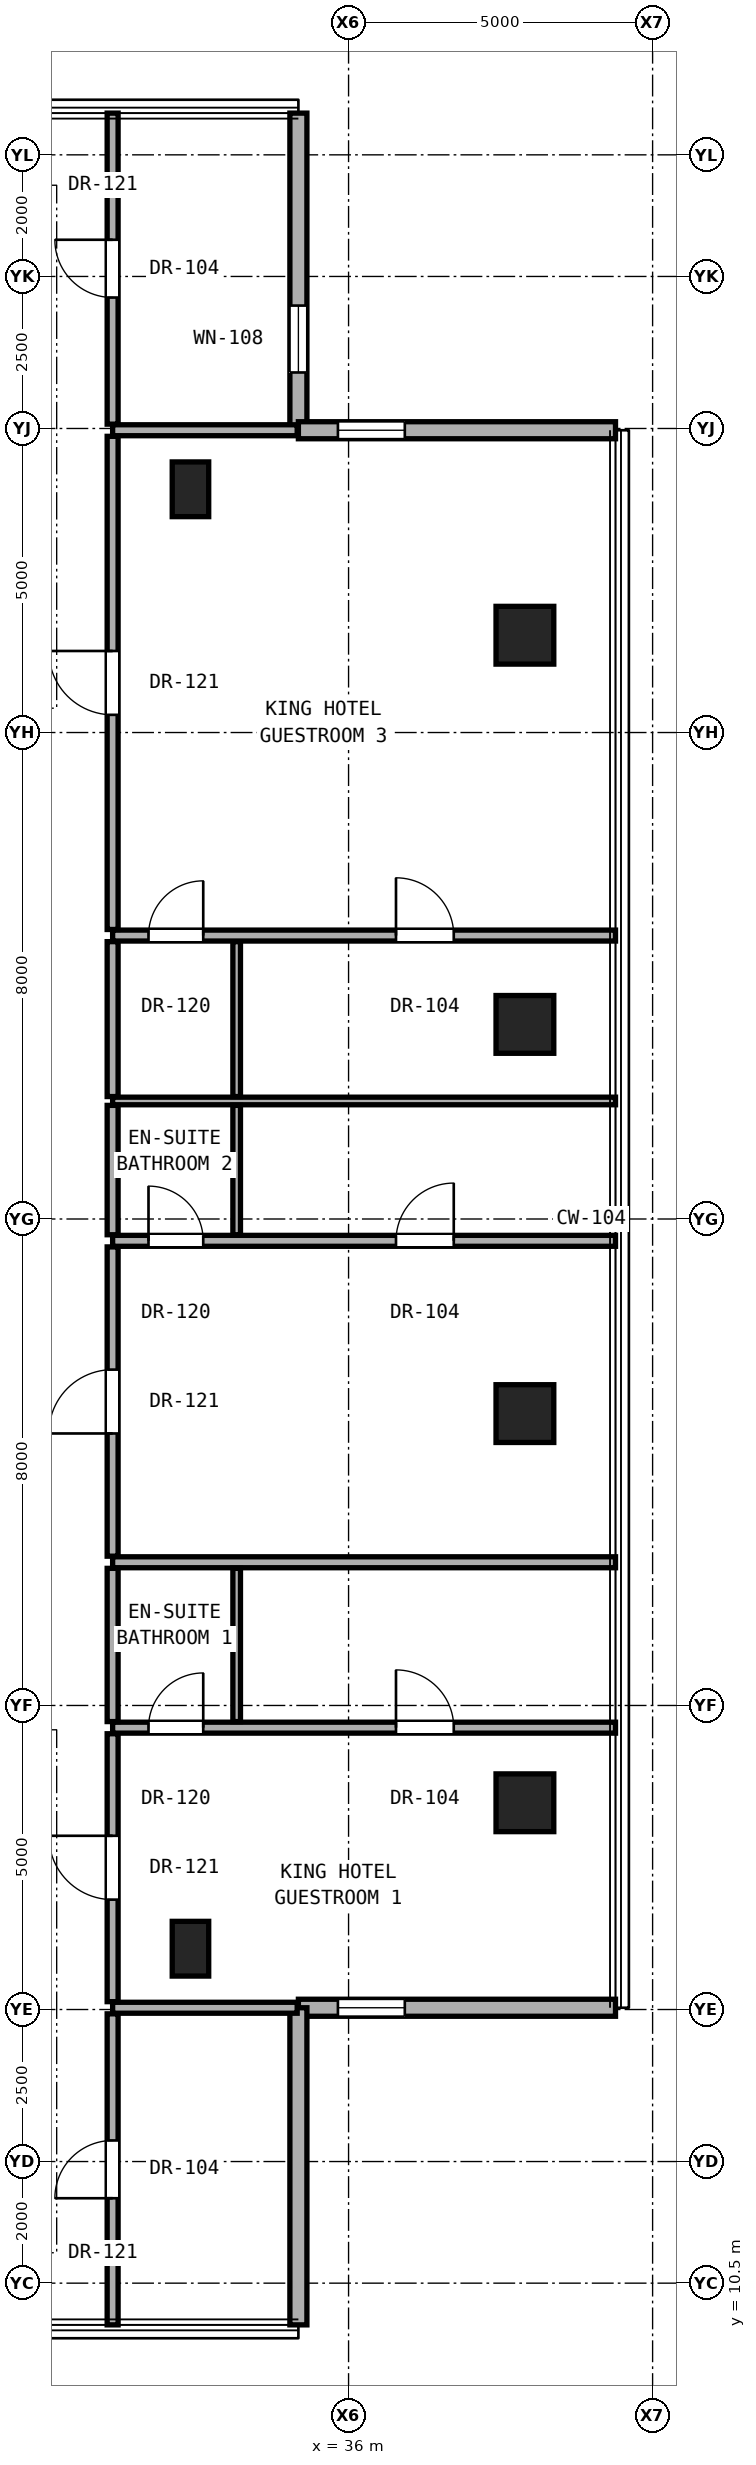
"""IFC4 building model, lengths in metres.
Left out: names, types, materials, properties, quantities, classifications, styles, units other than length and angle.
Written with IfcOpenShell. Run it as: python <this file> out.ifc"""

import sys

from ifc_helpers import new_model, si_unit, direction, frame, frame_2d, origin, origin_2d, place, context, subcontext, project, spatial, rectangle, hollow_rectangle, extrude, element, fill, save


model = new_model("IFC4")
c1 = context("Model", 3, precision=1e-05, world=origin(), true_north=direction((0.0, 1.0)))
c2 = subcontext(c1, "Body", "Model", "MODEL_VIEW")
j1 = project(units=[si_unit("LENGTHUNIT", "METRE"), si_unit("PLANEANGLEUNIT", "RADIAN")], contexts=[c1])
p1 = place(None, origin())
s1 = spatial("IfcSite", under=j1, at=p1, CompositionType="ELEMENT")
p2 = place(p1, origin())
s2 = spatial("IfcBuilding", under=s1, at=p2, CompositionType="ELEMENT")
p3 = place(p2, frame((0.0, 0.0, 190.15)))
s3 = spatial("IfcBuildingStorey", under=s2, at=p3, CompositionType="ELEMENT", Elevation=190.15)
for number, where, z_axis, x_axis in (
    (1, (38.9, 18.4, 0.0), (0.0, 0.0, 1.0), (1.0, 0.0, 0.0)),
    (2, (38.9, 24.8, 0.0), (0.0, 0.0, 1.0), (1.0, 0.0, 0.0)),
    (3, (38.9, 31.2, 0.0), (0.0, 0.0, 1.0), (1.0, 0.0, 0.0)),
    (4, (38.9, 37.6, 0.0), (0.0, 0.0, 1.0), (1.0, 0.0, 0.0)),
):
    element("IfcColumn", number, at=place(p3, frame(where, z_axis=z_axis, x_axis=x_axis)), inside=s3, PredefinedType="COLUMN", context=c2, shape_type="SweptSolid", body=[
        extrude(hollow_rectangle(XDim=0.95, YDim=0.95, WallThickness=0.05, at=origin_2d()), origin(), (0.0, 0.0, 1.0), 3.25),
    ])
for number, where, z_axis, x_axis in (
    (5, (33.4, 16.0, 0.0), (0.0, 0.0, 1.0), (1.0, 0.0, 0.0)),
    (6, (33.4, 40.0, 0.0), (0.0, 0.0, 1.0), (1.0, 0.0, 0.0)),
):
    element("IfcColumn", number, at=place(p3, frame(where, z_axis=z_axis, x_axis=x_axis)), inside=s3, PredefinedType="PILASTER", context=c2, shape_type="SweptSolid", body=[
        extrude(rectangle(XDim=0.6, YDim=0.9, at=origin_2d()), origin(), (0.0, 0.0, 1.0), 3.25),
    ])
p4 = place(p3, frame((35.175, 40.971, 0.0), z_axis=(0.0, 0.0, 1.0), x_axis=(0.0, 1.0, 0.0)))
e7 = element("IfcWall", 7, at=p4, inside=s3, PredefinedType="SOLIDWALL", context=c2, shape_type="SweptSolid", body=[
    extrude(rectangle(XDim=5.215, YDim=0.28, at=frame_2d((2.607, 0.0))), origin(), (0.0, 0.0, 1.0), 3.03),
])
p5 = place(p4, frame((0.95, 0.0, 0.85)))
e8 = element("IfcOpeningElement", 8, at=p5, cuts=e7, PredefinedType="OPENING", context=c2, shape_type="SweptSolid", body=[
    extrude(rectangle(XDim=1.1, YDim=2.0, at=frame_2d((0.55, 1.0))), frame((0.0, 0.15, 0.0), z_axis=(0.0, -1.0, 0.0), x_axis=(1.0, 0.0, 0.0)), (0.0, 0.0, 1.0), 0.3),
])
p6 = place(p3, frame((35.175, 15.029, 0.0), z_axis=(0.0, 0.0, 1.0), x_axis=(1.0, 0.0, 0.0)))
e9 = element("IfcWall", 9, at=p6, inside=s3, PredefinedType="SOLIDWALL", context=c2, shape_type="SweptSolid", body=[
    extrude(rectangle(XDim=5.215, YDim=0.28, at=frame_2d((2.607, 0.0))), origin(), (0.0, 0.0, 1.0), 3.03),
])
p7 = place(p6, frame((0.65, 0.0, 0.85)))
e10 = element("IfcOpeningElement", 10, at=p7, cuts=e9, PredefinedType="OPENING", context=c2, shape_type="SweptSolid", body=[
    extrude(rectangle(XDim=1.1, YDim=2.0, at=frame_2d((0.55, 1.0))), frame((0.0, 0.15, 0.0), z_axis=(0.0, -1.0, 0.0), x_axis=(1.0, 0.0, 0.0)), (0.0, 0.0, 1.0), 0.3),
])
p8 = place(p3, frame((35.175, 9.814, 0.0), z_axis=(0.0, 0.0, 1.0), x_axis=(0.0, 1.0, 0.0)))
e11 = element("IfcWall", 11, at=p8, inside=s3, PredefinedType="SOLIDWALL", context=c2, shape_type="SweptSolid", body=[
    extrude(rectangle(XDim=5.215, YDim=0.28, at=frame_2d((2.607, 0.0))), origin(), (0.0, 0.0, 1.0), 3.03),
])
p9 = place(p3, frame((40.39, 40.971, 0.0), z_axis=(0.0, 0.0, 1.0), x_axis=(-1.0, 0.0, 0.0)))
e12 = element("IfcWall", 12, at=p9, inside=s3, PredefinedType="SOLIDWALL", context=c2, shape_type="SweptSolid", body=[
    extrude(rectangle(XDim=5.215, YDim=0.28, at=frame_2d((2.607, 0.0))), origin(), (0.0, 0.0, 1.0), 3.03),
])
p10 = place(p9, frame((3.465, 0.0, 0.85)))
e13 = element("IfcOpeningElement", 13, at=p10, cuts=e12, PredefinedType="OPENING", context=c2, shape_type="SweptSolid", body=[
    extrude(rectangle(XDim=1.1, YDim=2.0, at=frame_2d((0.55, 1.0))), frame((0.0, 0.15, 0.0), z_axis=(0.0, -1.0, 0.0), x_axis=(1.0, 0.0, 0.0)), (0.0, 0.0, 1.0), 0.3),
])
p11 = place(p3, frame((32.12, 15.029, 0.0), z_axis=(0.0, 0.0, 1.0), x_axis=(1.0, 0.0, 0.0)))
e14 = element("IfcWall", 14, at=p11, inside=s3, PredefinedType="PARTITIONING", context=c2, shape_type="SweptSolid", body=[
    extrude(rectangle(XDim=3.035, YDim=0.18, at=frame_2d((1.518, 0.0))), origin(), (0.0, 0.0, 1.0), 3.05),
])
p12 = place(p3, frame((32.12, 19.635, 0.0), z_axis=(0.0, 0.0, 1.0), x_axis=(1.0, 0.0, 0.0)))
e15 = element("IfcWall", 15, at=p12, inside=s3, PredefinedType="PARTITIONING", context=c2, shape_type="SweptSolid", body=[
    extrude(rectangle(XDim=8.27, YDim=0.18, at=frame_2d((4.135, 0.0))), origin(), (0.0, 0.0, 1.0), 2.269),
])
p13 = place(p12, frame((4.66, 0.0, 0.0)))
e16 = element("IfcOpeningElement", 16, at=p13, cuts=e15, PredefinedType="OPENING", context=c2, shape_type="SweptSolid", body=[
    extrude(rectangle(XDim=0.95, YDim=2.15, at=frame_2d((0.475, 1.075))), frame((0.0, 0.1, 0.0), z_axis=(0.0, -1.0, 0.0), x_axis=(1.0, 0.0, 0.0)), (0.0, 0.0, 1.0), 0.2),
])
p14 = place(p12, frame((0.59, 0.0, 0.0)))
e17 = element("IfcOpeningElement", 17, at=p14, cuts=e15, PredefinedType="OPENING", context=c2, shape_type="SweptSolid", body=[
    extrude(rectangle(XDim=0.9, YDim=2.1, at=frame_2d((0.45, 1.05))), frame((0.0, 0.1, 0.0), z_axis=(0.0, -1.0, 0.0), x_axis=(1.0, 0.0, 0.0)), (0.0, 0.0, 1.0), 0.2),
])
p15 = place(p3, frame((32.12, 22.355, 0.0), z_axis=(0.0, 0.0, 1.0), x_axis=(1.0, 0.0, 0.0)))
e18 = element("IfcWall", 18, at=p15, inside=s3, PredefinedType="PARTITIONING", context=c2, shape_type="SweptSolid", body=[
    extrude(rectangle(XDim=8.27, YDim=0.18, at=frame_2d((4.135, 0.0))), origin(), (0.0, 0.0, 1.0), 2.269),
])
p16 = place(p3, frame((32.12, 27.641, 0.0), z_axis=(0.0, 0.0, 1.0), x_axis=(1.0, 0.0, 0.0)))
e19 = element("IfcWall", 19, at=p16, inside=s3, PredefinedType="PARTITIONING", context=c2, shape_type="SweptSolid", body=[
    extrude(rectangle(XDim=8.27, YDim=0.18, at=frame_2d((4.135, 0.0))), origin(), (0.0, 0.0, 1.0), 2.269),
])
p17 = place(p16, frame((4.66, 0.0, 0.0)))
e20 = element("IfcOpeningElement", 20, at=p17, cuts=e19, PredefinedType="OPENING", context=c2, shape_type="SweptSolid", body=[
    extrude(rectangle(XDim=0.95, YDim=2.15, at=frame_2d((0.475, 1.075))), frame((0.0, 0.1, 0.0), z_axis=(0.0, -1.0, 0.0), x_axis=(1.0, 0.0, 0.0)), (0.0, 0.0, 1.0), 0.2),
])
p18 = place(p16, frame((0.59, 0.0, 0.0)))
e21 = element("IfcOpeningElement", 21, at=p18, cuts=e19, PredefinedType="OPENING", context=c2, shape_type="SweptSolid", body=[
    extrude(rectangle(XDim=0.9, YDim=2.1, at=frame_2d((0.45, 1.05))), frame((0.0, 0.1, 0.0), z_axis=(0.0, -1.0, 0.0), x_axis=(1.0, 0.0, 0.0)), (0.0, 0.0, 1.0), 0.2),
])
p19 = place(p3, frame((32.12, 29.941, 0.0), z_axis=(0.0, 0.0, 1.0), x_axis=(1.0, 0.0, 0.0)))
e22 = element("IfcWall", 22, at=p19, inside=s3, PredefinedType="PARTITIONING", context=c2, shape_type="SweptSolid", body=[
    extrude(rectangle(XDim=8.27, YDim=0.125, at=frame_2d((4.135, 0.0))), origin(), (0.0, 0.0, 1.0), 2.269),
])
p20 = place(p3, frame((32.12, 32.661, 0.0), z_axis=(0.0, 0.0, 1.0), x_axis=(1.0, 0.0, 0.0)))
e23 = element("IfcWall", 23, at=p20, inside=s3, PredefinedType="PARTITIONING", context=c2, shape_type="SweptSolid", body=[
    extrude(rectangle(XDim=8.27, YDim=0.18, at=frame_2d((4.135, 0.0))), origin(), (0.0, 0.0, 1.0), 2.269),
])
p21 = place(p20, frame((4.66, 0.0, 0.0)))
e24 = element("IfcOpeningElement", 24, at=p21, cuts=e23, PredefinedType="OPENING", context=c2, shape_type="SweptSolid", body=[
    extrude(rectangle(XDim=0.95, YDim=2.15, at=frame_2d((0.475, 1.075))), frame((0.0, 0.1, 0.0), z_axis=(0.0, -1.0, 0.0), x_axis=(1.0, 0.0, 0.0)), (0.0, 0.0, 1.0), 0.2),
])
p22 = place(p20, frame((0.59, 0.0, 0.0)))
e25 = element("IfcOpeningElement", 25, at=p22, cuts=e23, PredefinedType="OPENING", context=c2, shape_type="SweptSolid", body=[
    extrude(rectangle(XDim=0.9, YDim=2.1, at=frame_2d((0.45, 1.05))), frame((0.0, 0.1, 0.0), z_axis=(0.0, -1.0, 0.0), x_axis=(1.0, 0.0, 0.0)), (0.0, 0.0, 1.0), 0.2),
])
p23 = place(p3, frame((32.12, 40.971, 0.0), z_axis=(0.0, 0.0, 1.0), x_axis=(1.0, 0.0, 0.0)))
e26 = element("IfcWall", 26, at=p23, inside=s3, PredefinedType="PARTITIONING", context=c2, shape_type="SweptSolid", body=[
    extrude(rectangle(XDim=3.035, YDim=0.18, at=frame_2d((1.518, 0.0))), origin(), (0.0, 0.0, 1.0), 3.05),
])
p24 = place(p3, frame((32.12, 9.814, 0.0), z_axis=(0.0, 0.0, 1.0), x_axis=(0.0, 1.0, 0.0)))
e27 = element("IfcWall", 27, at=p24, inside=s3, PredefinedType="PARTITIONING", context=c2, shape_type="SweptSolid", body=[
    extrude(rectangle(XDim=5.115, YDim=0.18, at=frame_2d((2.558, 0.0))), origin(), (0.0, 0.0, 1.0), 3.05),
])
p25 = place(p24, frame((2.083, 0.0, 0.0)))
e28 = element("IfcOpeningElement", 28, at=p25, cuts=e27, PredefinedType="OPENING", context=c2, shape_type="SweptSolid", body=[
    extrude(rectangle(XDim=0.95, YDim=2.15, at=frame_2d((0.475, 1.075))), frame((0.0, 0.1, 0.0), z_axis=(0.0, -1.0, 0.0), x_axis=(1.0, 0.0, 0.0)), (0.0, 0.0, 1.0), 0.2),
])
p26 = place(p3, frame((32.12, 15.129, 0.0), z_axis=(0.0, 0.0, 1.0), x_axis=(0.0, 1.0, 0.0)))
e29 = element("IfcWall", 29, at=p26, inside=s3, PredefinedType="PARTITIONING", context=c2, shape_type="SweptSolid", body=[
    extrude(rectangle(XDim=4.406, YDim=0.18, at=frame_2d((2.203, 0.0))), origin(), (0.0, 0.0, 1.0), 2.442),
])
p27 = place(p26, frame((1.678, 0.0, 0.0)))
e30 = element("IfcOpeningElement", 30, at=p27, cuts=e29, PredefinedType="OPENING", context=c2, shape_type="SweptSolid", body=[
    extrude(rectangle(XDim=1.05, YDim=2.2, at=frame_2d((0.525, 1.1))), frame((0.0, 0.1, 0.0), z_axis=(0.0, -1.0, 0.0), x_axis=(1.0, 0.0, 0.0)), (0.0, 0.0, 1.0), 0.2),
])
p28 = place(p3, frame((32.12, 19.735, 0.0), z_axis=(0.0, 0.0, 1.0), x_axis=(0.0, 1.0, 0.0)))
e31 = element("IfcWall", 31, at=p28, inside=s3, PredefinedType="PARTITIONING", context=c2, shape_type="SweptSolid", body=[
    extrude(rectangle(XDim=2.52, YDim=0.18, at=frame_2d((1.26, 0.0))), origin(), (0.0, 0.0, 1.0), 3.05),
])
p29 = place(p3, frame((32.12, 22.455, 0.0), z_axis=(0.0, 0.0, 1.0), x_axis=(0.0, 1.0, 0.0)))
e32 = element("IfcWall", 32, at=p29, inside=s3, PredefinedType="PARTITIONING", context=c2, shape_type="SweptSolid", body=[
    extrude(rectangle(XDim=5.086, YDim=0.18, at=frame_2d((2.543, 0.0))), origin(), (0.0, 0.0, 1.0), 2.346),
])
p30 = place(p29, frame((2.018, 0.0, 0.0)))
e33 = element("IfcOpeningElement", 33, at=p30, cuts=e32, PredefinedType="OPENING", context=c2, shape_type="SweptSolid", body=[
    extrude(rectangle(XDim=1.05, YDim=2.2, at=frame_2d((0.525, 1.1))), frame((0.0, 0.1, 0.0), z_axis=(0.0, -1.0, 0.0), x_axis=(1.0, 0.0, 0.0)), (0.0, 0.0, 1.0), 0.2),
])
p31 = place(p3, frame((32.12, 27.741, 0.0), z_axis=(0.0, 0.0, 1.0), x_axis=(0.0, 1.0, 0.0)))
e34 = element("IfcWall", 34, at=p31, inside=s3, PredefinedType="PARTITIONING", context=c2, shape_type="SweptSolid", body=[
    extrude(rectangle(XDim=2.127, YDim=0.18, at=frame_2d((1.064, 0.0))), origin(), (0.0, 0.0, 1.0), 3.05),
])
p32 = place(p3, frame((32.12, 30.013, 0.0), z_axis=(0.0, 0.0, 1.0), x_axis=(0.0, 1.0, 0.0)))
e35 = element("IfcWall", 35, at=p32, inside=s3, PredefinedType="PARTITIONING", context=c2, shape_type="SweptSolid", body=[
    extrude(rectangle(XDim=2.548, YDim=0.18, at=frame_2d((1.274, 0.0))), origin(), (0.0, 0.0, 1.0), 2.346),
])
p33 = place(p3, frame((32.12, 32.761, 0.0), z_axis=(0.0, 0.0, 1.0), x_axis=(0.0, 1.0, 0.0)))
e36 = element("IfcWall", 36, at=p33, inside=s3, PredefinedType="PARTITIONING", context=c2, shape_type="SweptSolid", body=[
    extrude(rectangle(XDim=8.11, YDim=0.18, at=frame_2d((4.055, 0.0))), origin(), (0.0, 0.0, 1.0), 2.442),
])
p34 = place(p33, frame((3.53, 0.0, 0.0)))
e37 = element("IfcOpeningElement", 37, at=p34, cuts=e36, PredefinedType="OPENING", context=c2, shape_type="SweptSolid", body=[
    extrude(rectangle(XDim=1.05, YDim=2.2, at=frame_2d((0.525, 1.1))), frame((0.0, 0.1, 0.0), z_axis=(0.0, -1.0, 0.0), x_axis=(1.0, 0.0, 0.0)), (0.0, 0.0, 1.0), 0.2),
])
p35 = place(p3, frame((32.12, 41.071, 0.0), z_axis=(0.0, 0.0, 1.0), x_axis=(0.0, 1.0, 0.0)))
e38 = element("IfcWall", 38, at=p35, inside=s3, PredefinedType="PARTITIONING", context=c2, shape_type="SweptSolid", body=[
    extrude(rectangle(XDim=5.115, YDim=0.18, at=frame_2d((2.558, 0.0))), origin(), (0.0, 0.0, 1.0), 3.05),
])
p36 = place(p35, frame((2.083, 0.0, 0.0)))
e39 = element("IfcOpeningElement", 39, at=p36, cuts=e38, PredefinedType="OPENING", context=c2, shape_type="SweptSolid", body=[
    extrude(rectangle(XDim=0.95, YDim=2.15, at=frame_2d((0.475, 1.075))), frame((0.0, 0.1, 0.0), z_axis=(0.0, -1.0, 0.0), x_axis=(1.0, 0.0, 0.0)), (0.0, 0.0, 1.0), 0.2),
])
p37 = place(p3, frame((34.16, 19.735, 0.0), z_axis=(0.0, 0.0, 1.0), x_axis=(0.0, 1.0, 0.0)))
e40 = element("IfcWall", 40, at=p37, inside=s3, PredefinedType="PARTITIONING", context=c2, shape_type="SweptSolid", body=[
    extrude(rectangle(XDim=2.52, YDim=0.125, at=frame_2d((1.26, 0.0))), origin(), (0.0, 0.0, 1.0), 3.05),
])
p38 = place(p3, frame((34.16, 27.741, 0.0), z_axis=(0.0, 0.0, 1.0), x_axis=(0.0, 1.0, 0.0)))
e41 = element("IfcWall", 41, at=p38, inside=s3, PredefinedType="PARTITIONING", context=c2, shape_type="SweptSolid", body=[
    extrude(rectangle(XDim=2.127, YDim=0.125, at=frame_2d((1.064, 0.0))), origin(), (0.0, 0.0, 1.0), 3.05),
])
p39 = place(p3, frame((34.16, 30.013, 0.0), z_axis=(0.0, 0.0, 1.0), x_axis=(0.0, 1.0, 0.0)))
e42 = element("IfcWall", 42, at=p39, inside=s3, PredefinedType="PARTITIONING", context=c2, shape_type="SweptSolid", body=[
    extrude(rectangle(XDim=2.548, YDim=0.125, at=frame_2d((1.274, 0.0))), origin(), (0.0, 0.0, 1.0), 2.346),
])
p40 = place(p5, origin())
e43 = element("IfcWindow", 43, at=p40, inside=s3, PartitioningType="SINGLE_PANEL", PredefinedType="WINDOW", context=c2, shape_type="SweptSolid", body=[
    extrude(rectangle(XDim=1.1, YDim=2.0, at=frame_2d((0.55, 1.0))), frame((0.0, 0.03, 0.0), z_axis=(0.0, -1.0, 0.0), x_axis=(1.0, 0.0, 0.0)), (0.0, 0.0, 1.0), 0.06),
])
fill(e8, e43)
p41 = place(p7, origin())
e44 = element("IfcWindow", 44, at=p41, inside=s3, PartitioningType="SINGLE_PANEL", PredefinedType="WINDOW", context=c2, shape_type="SweptSolid", body=[
    extrude(rectangle(XDim=1.1, YDim=2.0, at=frame_2d((0.55, 1.0))), frame((0.0, 0.03, 0.0), z_axis=(0.0, -1.0, 0.0), x_axis=(1.0, 0.0, 0.0)), (0.0, 0.0, 1.0), 0.06),
])
fill(e10, e44)
p42 = place(p10, origin())
e45 = element("IfcWindow", 45, at=p42, inside=s3, PartitioningType="SINGLE_PANEL", PredefinedType="WINDOW", context=c2, shape_type="SweptSolid", body=[
    extrude(rectangle(XDim=1.1, YDim=2.0, at=frame_2d((0.55, 1.0))), frame((0.0, 0.03, 0.0), z_axis=(0.0, -1.0, 0.0), x_axis=(1.0, 0.0, 0.0)), (0.0, 0.0, 1.0), 0.06),
])
fill(e13, e45)
p43 = place(p27, origin())
e46 = element("IfcDoor", 46, at=p43, inside=s3, OperationType="SINGLE_SWING_RIGHT", PredefinedType="DOOR", context=c2, shape_type="SweptSolid", body=[
    extrude(rectangle(XDim=1.05, YDim=2.2, at=frame_2d((0.525, 1.1))), frame((0.0, 0.025, 0.0), z_axis=(0.0, -1.0, 0.0), x_axis=(1.0, 0.0, 0.0)), (0.0, 0.0, 1.0), 0.05),
])
fill(e30, e46)
p44 = place(p13, origin())
e47 = element("IfcDoor", 47, at=p44, inside=s3, OperationType="SINGLE_SWING_LEFT", PredefinedType="DOOR", context=c2, shape_type="SweptSolid", body=[
    extrude(rectangle(XDim=0.95, YDim=2.15, at=frame_2d((0.475, 1.075))), frame((0.0, 0.025, 0.0), z_axis=(0.0, -1.0, 0.0), x_axis=(1.0, 0.0, 0.0)), (0.0, 0.0, 1.0), 0.05),
])
fill(e16, e47)
p45 = place(p14, origin())
e48 = element("IfcDoor", 48, at=p45, inside=s3, OperationType="SINGLE_SWING_RIGHT", PredefinedType="DOOR", context=c2, shape_type="SweptSolid", body=[
    extrude(rectangle(XDim=0.9, YDim=2.1, at=frame_2d((0.45, 1.05))), frame((0.0, 0.025, 0.0), z_axis=(0.0, -1.0, 0.0), x_axis=(1.0, 0.0, 0.0)), (0.0, 0.0, 1.0), 0.05),
])
fill(e17, e48)
p46 = place(p30, origin())
e49 = element("IfcDoor", 49, at=p46, inside=s3, OperationType="SINGLE_SWING_LEFT", PredefinedType="DOOR", context=c2, shape_type="SweptSolid", body=[
    extrude(rectangle(XDim=1.05, YDim=2.2, at=frame_2d((0.525, 1.1))), frame((0.0, 0.025, 0.0), z_axis=(0.0, -1.0, 0.0), x_axis=(1.0, 0.0, 0.0)), (0.0, 0.0, 1.0), 0.05),
])
fill(e33, e49)
p47 = place(p17, origin())
e50 = element("IfcDoor", 50, at=p47, inside=s3, OperationType="SINGLE_SWING_RIGHT", PredefinedType="DOOR", context=c2, shape_type="SweptSolid", body=[
    extrude(rectangle(XDim=0.95, YDim=2.15, at=frame_2d((0.475, 1.075))), frame((0.0, 0.025, 0.0), z_axis=(0.0, -1.0, 0.0), x_axis=(1.0, 0.0, 0.0)), (0.0, 0.0, 1.0), 0.05),
])
fill(e20, e50)
p48 = place(p18, origin())
e51 = element("IfcDoor", 51, at=p48, inside=s3, OperationType="SINGLE_SWING_LEFT", PredefinedType="DOOR", context=c2, shape_type="SweptSolid", body=[
    extrude(rectangle(XDim=0.9, YDim=2.1, at=frame_2d((0.45, 1.05))), frame((0.0, 0.025, 0.0), z_axis=(0.0, -1.0, 0.0), x_axis=(1.0, 0.0, 0.0)), (0.0, 0.0, 1.0), 0.05),
])
fill(e21, e51)
p49 = place(p34, origin())
e52 = element("IfcDoor", 52, at=p49, inside=s3, OperationType="SINGLE_SWING_RIGHT", PredefinedType="DOOR", context=c2, shape_type="SweptSolid", body=[
    extrude(rectangle(XDim=1.05, YDim=2.2, at=frame_2d((0.525, 1.1))), frame((0.0, 0.025, 0.0), z_axis=(0.0, -1.0, 0.0), x_axis=(1.0, 0.0, 0.0)), (0.0, 0.0, 1.0), 0.05),
])
fill(e37, e52)
p50 = place(p21, origin())
e53 = element("IfcDoor", 53, at=p50, inside=s3, OperationType="SINGLE_SWING_LEFT", PredefinedType="DOOR", context=c2, shape_type="SweptSolid", body=[
    extrude(rectangle(XDim=0.95, YDim=2.15, at=frame_2d((0.475, 1.075))), frame((0.0, 0.025, 0.0), z_axis=(0.0, -1.0, 0.0), x_axis=(1.0, 0.0, 0.0)), (0.0, 0.0, 1.0), 0.05),
])
fill(e24, e53)
p51 = place(p22, origin())
e54 = element("IfcDoor", 54, at=p51, inside=s3, OperationType="SINGLE_SWING_RIGHT", PredefinedType="DOOR", context=c2, shape_type="SweptSolid", body=[
    extrude(rectangle(XDim=0.9, YDim=2.1, at=frame_2d((0.45, 1.05))), frame((0.0, 0.025, 0.0), z_axis=(0.0, -1.0, 0.0), x_axis=(1.0, 0.0, 0.0)), (0.0, 0.0, 1.0), 0.05),
])
fill(e25, e54)
p52 = place(p25, origin())
e55 = element("IfcDoor", 55, at=p52, inside=s3, OperationType="SINGLE_SWING_LEFT", PredefinedType="DOOR", context=c2, shape_type="SweptSolid", body=[
    extrude(rectangle(XDim=0.95, YDim=2.15, at=frame_2d((0.475, 1.075))), frame((0.0, 0.025, 0.0), z_axis=(0.0, -1.0, 0.0), x_axis=(1.0, 0.0, 0.0)), (0.0, 0.0, 1.0), 0.05),
])
fill(e28, e55)
p53 = place(p36, origin())
e56 = element("IfcDoor", 56, at=p53, inside=s3, OperationType="SINGLE_SWING_RIGHT", PredefinedType="DOOR", context=c2, shape_type="SweptSolid", body=[
    extrude(rectangle(XDim=0.95, YDim=2.15, at=frame_2d((0.475, 1.075))), frame((0.0, 0.025, 0.0), z_axis=(0.0, -1.0, 0.0), x_axis=(1.0, 0.0, 0.0)), (0.0, 0.0, 1.0), 0.05),
])
fill(e39, e56)
save(model, sys.argv[1])
